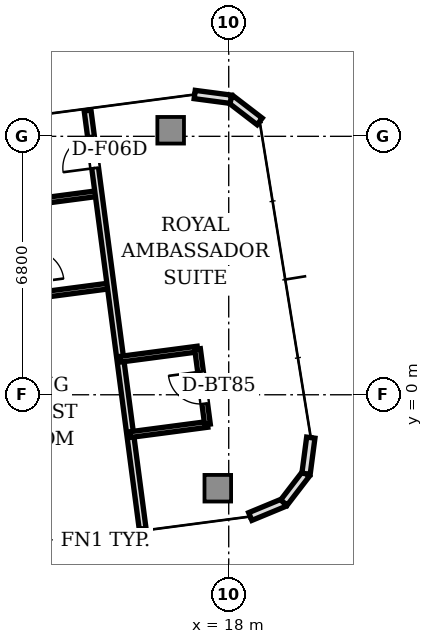
"""IFC4 building model, lengths in metres.
Left out: names, types, materials, properties, quantities, classifications, styles, units other than length and angle.
Written with IfcOpenShell. Run it as: python <this file> out.ifc"""

import sys

from ifc_helpers import new_model, si_unit, direction, frame, frame_2d, origin, origin_2d, place, context, subcontext, project, spatial, rectangle, extrude, source, transform, mapped, element, fill, save


model = new_model("IFC4")
c1 = context("Model", 3, precision=1e-05, world=origin(), true_north=direction((0.0, 1.0)))
c2 = subcontext(c1, "Body", "Model", "MODEL_VIEW")
j1 = project(units=[si_unit("LENGTHUNIT", "METRE"), si_unit("PLANEANGLEUNIT", "RADIAN")], contexts=[c1])
p1 = place(None, origin())
s1 = spatial("IfcSite", under=j1, at=p1, CompositionType="ELEMENT")
p2 = place(p1, origin())
s2 = spatial("IfcBuilding", under=s1, at=p2, CompositionType="ELEMENT")
p3 = place(p2, frame((0.0, 0.0, 269.1)))
s3 = spatial("IfcBuildingStorey", under=s2, at=p3, CompositionType="ELEMENT", Elevation=269.1)
m1 = source(origin(), c2, "Body", "SweptSolid", [
    extrude(rectangle(XDim=0.7, YDim=0.7, at=origin_2d()), origin(), (0.0, 0.0, 1.0), 3.11),
])
for number, where, z_axis, x_axis in (
    (1, (17.712, -2.459, 0.0), (0.0, 0.0, 1.0), (1.0, 0.0, 0.0)),
    (2, (16.472, 6.96, 0.0), (0.0, 0.0, 1.0), (1.0, 0.0, 0.0)),
):
    element("IfcColumn", number, at=place(p3, frame(where, z_axis=z_axis, x_axis=x_axis)), inside=s3, PredefinedType="COLUMN", context=c2, shape_type="MappedRepresentation", body=[
        mapped(m1, transform((0.0, 0.0, 0.0), scale=1.0)),
    ])
p4 = place(p3, frame((18.567, -3.204, 0.0), z_axis=(0.0, 0.0, 1.0), x_axis=(0.923926759112, 0.382569397359, 0.0)))
e3 = element("IfcWall", 3, at=p4, inside=s3, PredefinedType="STANDARD", context=c2, shape_type="SweptSolid", body=[
    extrude(rectangle(XDim=0.958, YDim=0.22, at=frame_2d((0.479, 0.0))), origin(), (0.0, 0.0, 1.0), 3.11),
])
for number, where, z_axis, x_axis in (
    (4, (19.452, -2.837, 0.0), (0.0, 0.0, 1.0), (0.609, 0.793, 0.0)),
    (5, (20.035, -2.078, 0.0), (0.0, 0.0, 1.0), (0.131, 0.991, 0.0)),
    (6, (18.814, 7.192, 0.0), (0.0, 0.0, 1.0), (-0.793, 0.609, 0.0)),
):
    element("IfcWall", number, at=place(p3, frame(where, z_axis=z_axis, x_axis=x_axis)), inside=s3, PredefinedType="STANDARD", context=c2, shape_type="SweptSolid", body=[
        extrude(rectangle(XDim=0.958, YDim=0.22, at=frame_2d((0.479, 0.0))), origin(), (0.0, 0.0, 1.0), 3.11),
    ])
p5 = place(p3, frame((18.055, 7.775, 0.0), z_axis=(0.0, 0.0, 1.0), x_axis=(-0.991449089759, 0.130494070426, 0.0)))
e7 = element("IfcWall", 7, at=p5, inside=s3, PredefinedType="STANDARD", context=c2, shape_type="SweptSolid", body=[
    extrude(rectangle(XDim=0.958, YDim=0.22, at=frame_2d((0.479, 0.0))), origin(), (0.0, 0.0, 1.0), 3.11),
])
p6 = place(p3, frame((6.354, 4.215, 0.0), z_axis=(0.0, 0.0, 1.0), x_axis=(0.991441861772, 0.130548974432, 0.0)))
e8 = element("IfcWall", 8, at=p6, inside=s3, PredefinedType="PARTITIONING", context=c2, shape_type="SweptSolid", body=[
    extrude(rectangle(XDim=8.29, YDim=0.15, at=frame_2d((4.145, 0.0))), origin(), (0.0, 0.0, 1.0), 2.66),
])
p7 = place(p6, frame((1.431, 0.0, 0.0)))
e9 = element("IfcOpeningElement", 9, at=p7, cuts=e8, PredefinedType="OPENING", context=c2, shape_type="SweptSolid", body=[
    extrude(rectangle(XDim=0.85, YDim=2.1, at=frame_2d((0.425, 1.05))), frame((0.0, 0.085, 0.0), z_axis=(0.0, -1.0, 0.0), x_axis=(1.0, 0.0, 0.0)), (0.0, 0.0, 1.0), 0.17),
])
p8 = place(p6, frame((4.602, 0.0, 0.0)))
e10 = element("IfcOpeningElement", 10, at=p8, cuts=e8, PredefinedType="OPENING", context=c2, shape_type="SweptSolid", body=[
    extrude(rectangle(XDim=0.85, YDim=2.1, at=frame_2d((0.425, 1.05))), frame((0.0, 0.085, 0.0), z_axis=(0.0, -1.0, 0.0), x_axis=(1.0, 0.0, 0.0)), (0.0, 0.0, 1.0), 0.17),
])
p9 = place(p3, frame((12.861, 2.601, 0.0), z_axis=(0.0, 0.0, 1.0), x_axis=(0.991444969909, 0.13052536781, 0.0)))
e11 = element("IfcWall", 11, at=p9, inside=s3, PredefinedType="PARTITIONING", context=c2, shape_type="SweptSolid", body=[
    extrude(rectangle(XDim=2.05, YDim=0.15, at=frame_2d((1.025, 0.0))), origin(), (0.0, 0.0, 1.0), 2.66),
])
p10 = place(p3, frame((15.735, -3.526, 0.0), z_axis=(0.0, 0.0, 1.0), x_axis=(-0.130515390239, 0.991446283422, 0.0)))
e12 = element("IfcWall", 12, at=p10, inside=s3, PredefinedType="PARTITIONING", context=c2, shape_type="SweptSolid", body=[
    extrude(rectangle(XDim=11.1, YDim=0.18, at=frame_2d((5.55, 0.0))), origin(), (0.0, 0.0, 1.0), 2.66),
])
p11 = place(p10, frame((9.575, 0.0, 0.0)))
e13 = element("IfcOpeningElement", 13, at=p11, cuts=e12, PredefinedType="OPENING", context=c2, shape_type="SweptSolid", body=[
    extrude(rectangle(XDim=0.85, YDim=2.1, at=frame_2d((0.425, 1.05))), frame((0.0, 0.1, 0.0), z_axis=(0.0, -1.0, 0.0), x_axis=(1.0, 0.0, 0.0)), (0.0, 0.0, 1.0), 0.2),
])
p12 = place(p3, frame((15.147, 0.935, 0.0), z_axis=(0.0, 0.0, 1.0), x_axis=(0.991444969909, 0.13052536781, 0.0)))
e14 = element("IfcWall", 14, at=p12, inside=s3, PredefinedType="PARTITIONING", context=c2, shape_type="SweptSolid", body=[
    extrude(rectangle(XDim=2.05, YDim=0.15, at=frame_2d((1.025, 0.0))), origin(), (0.0, 0.0, 1.0), 2.66),
])
p13 = place(p3, frame((15.409, -1.048, 0.0), z_axis=(0.0, 0.0, 1.0), x_axis=(0.991458349128, 0.130423701621, 0.0)))
e15 = element("IfcWall", 15, at=p13, inside=s3, PredefinedType="PARTITIONING", context=c2, shape_type="SweptSolid", body=[
    extrude(rectangle(XDim=2.05, YDim=0.15, at=frame_2d((1.025, 0.0))), origin(), (0.0, 0.0, 1.0), 2.66),
])
p14 = place(p3, frame((17.441, -0.78, 0.0), z_axis=(0.0, 0.0, 1.0), x_axis=(-0.130492404742, 0.991449308994, 0.0)))
e16 = element("IfcWall", 16, at=p14, inside=s3, PredefinedType="PARTITIONING", context=c2, shape_type="SweptSolid", body=[
    extrude(rectangle(XDim=2.0, YDim=0.15, at=frame_2d((1.0, 0.0))), origin(), (0.0, 0.0, 1.0), 2.63),
])
p15 = place(p14, frame((0.55, 0.0, 0.0)))
e17 = element("IfcOpeningElement", 17, at=p15, cuts=e16, PredefinedType="OPENING", context=c2, shape_type="SweptSolid", body=[
    extrude(rectangle(XDim=0.85, YDim=2.1, at=frame_2d((0.425, 1.05))), frame((0.0, 0.085, 0.0), z_axis=(0.0, -1.0, 0.0), x_axis=(1.0, 0.0, 0.0)), (0.0, 0.0, 1.0), 0.17),
])
m2 = source(origin(), c2, "Body", "SweptSolid", [
    extrude(rectangle(XDim=0.85, YDim=0.05, at=origin_2d()), origin(), (0.0, 0.0, 1.0), 2.1),
])
p16 = place(p15, frame((0.425, 0.0, 0.0)))
e18 = element("IfcDoor", 18, at=p16, inside=s3, OperationType="SINGLE_SWING_RIGHT", PredefinedType="DOOR", context=c2, shape_type="MappedRepresentation", body=[
    mapped(m2, transform((0.0, 0.0, 0.0), scale=1.0)),
])
fill(e17, e18)
p17 = place(p11, frame((0.425, 0.0, 0.0)))
e19 = element("IfcDoor", 19, at=p17, inside=s3, OperationType="SINGLE_SWING_LEFT", PredefinedType="DOOR", context=c2, shape_type="MappedRepresentation", body=[
    mapped(m2, transform((0.0, 0.0, 0.0), scale=1.0)),
])
fill(e13, e19)
save(model, sys.argv[1])
